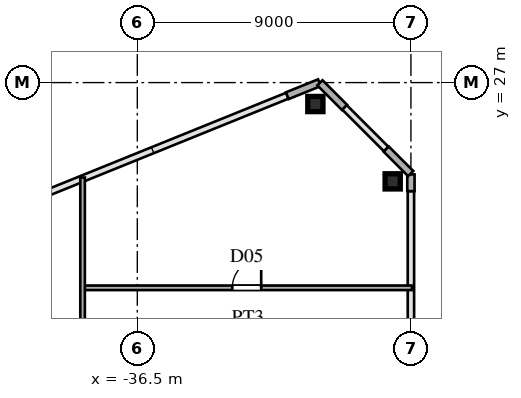
"""IFC4 building model, lengths in metres.
Left out: names, types, materials, properties, quantities, classifications, styles, units other than length and angle.
Written with IfcOpenShell. Run it as: python <this file> out.ifc"""

import sys

from ifc_helpers import new_model, si_unit, direction, frame, frame_2d, origin, origin_2d, place, context, subcontext, project, spatial, rectangle, hollow_rectangle, extrude, source, transform, mapped, element, fill, save


model = new_model("IFC4")
c1 = context("Model", 3, precision=1e-05, world=origin(), true_north=direction((0.0, 1.0)))
c2 = subcontext(c1, "Body", "Model", "MODEL_VIEW")
j1 = project(units=[si_unit("LENGTHUNIT", "METRE"), si_unit("PLANEANGLEUNIT", "RADIAN")], contexts=[c1])
p1 = place(None, origin())
s1 = spatial("IfcSite", under=j1, at=p1, CompositionType="ELEMENT")
p2 = place(p1, origin())
s2 = spatial("IfcBuilding", under=s1, at=p2, CompositionType="ELEMENT")
p3 = place(p2, frame((0.0, 0.0, 18.9)))
s3 = spatial("IfcBuildingStorey", under=s2, at=p3, CompositionType="ELEMENT", Elevation=18.9)
m1 = source(origin(), c2, "Body", "SweptSolid", [
    extrude(hollow_rectangle(XDim=0.5, YDim=0.5, WallThickness=0.02, at=origin_2d()), origin(), (0.0, 0.0, 1.0), 3.6),
])
for number, where, z_axis, x_axis in (
    (1, (-28.1, 23.751, 0.0), (0.0, 0.0, 1.0), (1.0, 0.0, 0.0)),
    (2, (-30.643, 26.295, 0.0), (0.0, 0.0, 1.0), (1.0, 0.0, 0.0)),
):
    element("IfcColumn", number, at=place(p3, frame(where, z_axis=z_axis, x_axis=x_axis)), inside=s3, PredefinedType="COLUMN", context=c2, shape_type="MappedRepresentation", body=[
        mapped(m1, transform((0.0, 0.0, 0.0), scale=1.0)),
    ])
p4 = place(p3, frame((-27.5, 23.43, 0.0), z_axis=(0.0, 0.0, 1.0), x_axis=(0.0, 1.0, 0.0)))
e3 = element("IfcWall", 3, at=p4, inside=s3, PredefinedType="SOLIDWALL", context=c2, shape_type="SweptSolid", body=[
    extrude(rectangle(XDim=0.55, YDim=0.24, at=frame_2d((0.275, 0.0))), origin(), (0.0, 0.0, 1.0), 3.38),
])
for number, where, z_axis, x_axis in (
    (4, (-27.507, 24.007, 0.0), (0.0, 0.0, 1.0), (-0.707, 0.707, 0.0)),
    (5, (-29.687, 26.187, 0.0), (0.0, 0.0, 1.0), (-0.707, 0.707, 0.0)),
):
    element("IfcWall", number, at=place(p3, frame(where, z_axis=z_axis, x_axis=x_axis)), inside=s3, PredefinedType="SOLIDWALL", context=c2, shape_type="SweptSolid", body=[
        extrude(rectangle(XDim=1.14, YDim=0.24, at=frame_2d((0.57, 0.0))), origin(), (0.0, 0.0, 1.0), 3.38),
    ])
p5 = place(p3, frame((-30.509, 26.996, 0.0), z_axis=(0.0, 0.0, 1.0), x_axis=(-0.927007103665, -0.375043770452, 0.0)))
e6 = element("IfcWall", 6, at=p5, inside=s3, PredefinedType="SOLIDWALL", context=c2, shape_type="SweptSolid", body=[
    extrude(rectangle(XDim=1.14, YDim=0.24, at=frame_2d((0.57, 0.0))), origin(), (0.0, 0.0, 1.0), 3.38),
])
p6 = place(p3, frame((-38.25, 20.25, 0.0), z_axis=(0.0, 0.0, 1.0), x_axis=(1.0, 0.0, 0.0)))
e7 = element("IfcWall", 7, at=p6, inside=s3, PredefinedType="PARTITIONING", context=c2, shape_type="SweptSolid", body=[
    extrude(rectangle(XDim=10.785, YDim=0.15, at=frame_2d((5.393, 0.0))), origin(), (0.0, 0.0, 1.0), 3.38),
])
p7 = place(p6, frame((4.875, 0.0, 0.0)))
e8 = element("IfcOpeningElement", 8, at=p7, cuts=e7, PredefinedType="OPENING", context=c2, shape_type="SweptSolid", body=[
    extrude(rectangle(XDim=0.95, YDim=2.15, at=frame_2d((0.475, 1.075))), frame((0.0, 0.085, 0.0), z_axis=(0.0, -1.0, 0.0), x_axis=(1.0, 0.0, 0.0)), (0.0, 0.0, 1.0), 0.17),
])
p8 = place(p3, frame((-38.3, 15.65, 0.0), z_axis=(0.0, 0.0, 1.0), x_axis=(0.0, 1.0, 0.0)))
e9 = element("IfcWall", 9, at=p8, inside=s3, PredefinedType="PARTITIONING", context=c2, shape_type="SweptSolid", body=[
    extrude(rectangle(XDim=8.228, YDim=0.15, at=frame_2d((4.114, 0.0))), origin(), (0.0, 0.0, 1.0), 3.38),
])
p9 = place(p8, frame((1.8, 0.0, 0.0)))
e10 = element("IfcOpeningElement", 10, at=p9, cuts=e9, PredefinedType="OPENING", context=c2, shape_type="SweptSolid", body=[
    extrude(rectangle(XDim=0.95, YDim=2.15, at=frame_2d((0.475, 1.075))), frame((0.0, 0.085, 0.0), z_axis=(0.0, -1.0, 0.0), x_axis=(1.0, 0.0, 0.0)), (0.0, 0.0, 1.0), 0.17),
])
m2 = source(origin(), c2, "Body", "SweptSolid", [
    extrude(rectangle(XDim=0.95, YDim=2.15, at=frame_2d((0.475, 1.075))), frame((0.0, 0.025, 0.0), z_axis=(0.0, -1.0, 0.0), x_axis=(1.0, 0.0, 0.0)), (0.0, 0.0, 1.0), 0.05),
])
p10 = place(p7, origin())
e11 = element("IfcDoor", 11, at=p10, inside=s3, OperationType="SINGLE_SWING_RIGHT", PredefinedType="DOOR", context=c2, shape_type="MappedRepresentation", body=[
    mapped(m2, transform((0.0, 0.0, 0.0), scale=1.0)),
])
fill(e8, e11)
save(model, sys.argv[1])
